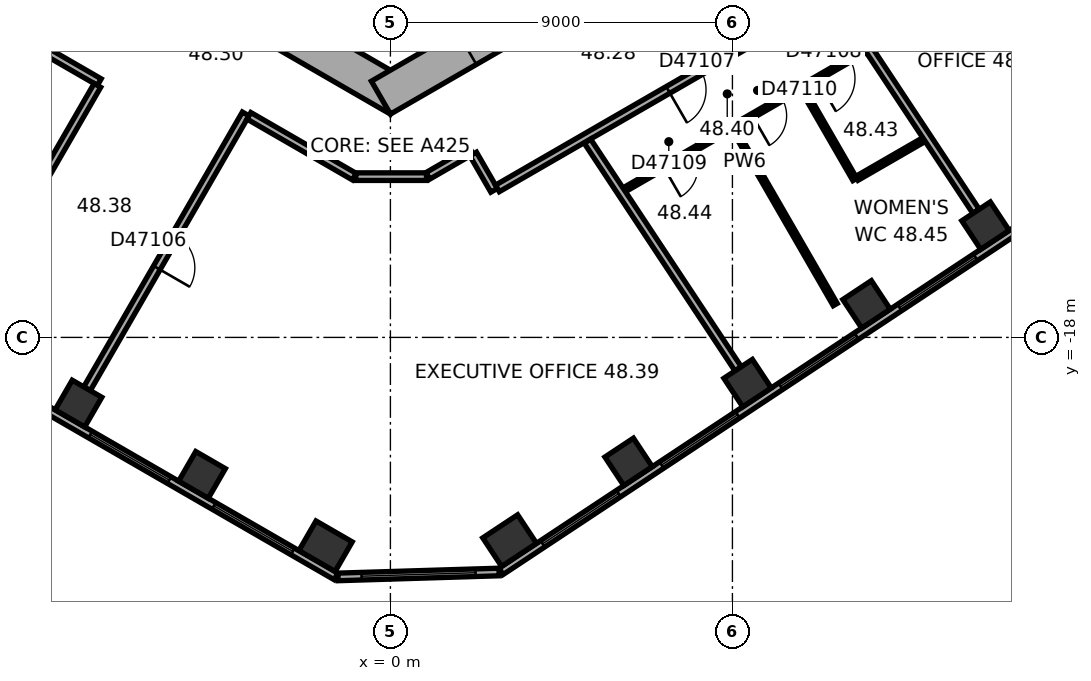
"""IFC4 building model, lengths in metres.
Left out: names, types, materials, properties, quantities, classifications, styles, units other than length and angle.
Written with IfcOpenShell. Run it as: python <this file> out.ifc"""

import sys

from ifc_helpers import new_model, si_unit, direction, frame, frame_2d, origin, origin_2d, place, context, subcontext, project, spatial, rectangle, extrude, element, fill, save


model = new_model("IFC4")
c1 = context("Model", 3, precision=1e-05, world=origin(), true_north=direction((0.0, 1.0)))
c2 = subcontext(c1, "Body", "Model", "MODEL_VIEW")
j1 = project(units=[si_unit("LENGTHUNIT", "METRE"), si_unit("PLANEANGLEUNIT", "RADIAN")], contexts=[c1])
p1 = place(None, origin())
s1 = spatial("IfcSite", under=j1, at=p1, CompositionType="ELEMENT")
p2 = place(p1, origin())
s2 = spatial("IfcBuilding", under=s1, at=p2, CompositionType="ELEMENT")
p3 = place(p2, frame((0.0, 0.0, 194.7)))
s3 = spatial("IfcBuildingStorey", under=s2, at=p3, CompositionType="ELEMENT", Elevation=194.7)
for number, where, z_axis, x_axis in (
    (1, (-8.208, -19.74, 0.0), (0.0, 0.0, 1.0), (0.866, -0.5, 0.0)),
    (2, (-4.958, -21.617, 0.0), (0.0, 0.0, 1.0), (0.866, -0.5, 0.0)),
):
    element("IfcColumn", number, at=place(p3, frame(where, z_axis=z_axis, x_axis=x_axis)), inside=s3, PredefinedType="COLUMN", context=c2, shape_type="SweptSolid", body=[
        extrude(rectangle(XDim=0.9, YDim=0.9, at=origin_2d()), origin(), (0.0, 0.0, 1.0), 3.7),
    ])
for number, where, z_axis, x_axis in (
    (3, (-1.706, -23.494, 0.0), (0.0, 0.0, 1.0), (0.866, -0.5, 0.0)),
    (4, (3.137, -23.346, 0.0), (0.0, 0.0, 1.0), (0.834, 0.552, 0.0)),
):
    element("IfcColumn", number, at=place(p3, frame(where, z_axis=z_axis, x_axis=x_axis)), inside=s3, PredefinedType="COLUMN", context=c2, shape_type="SweptSolid", body=[
        extrude(rectangle(XDim=1.1, YDim=0.9, at=origin_2d()), origin(), (0.0, 0.0, 1.0), 3.7),
    ])
for number, where, z_axis, x_axis in (
    (5, (6.268, -21.274, 0.0), (0.0, 0.0, 1.0), (0.834, 0.552, 0.0)),
    (6, (9.398, -19.202, 0.0), (0.0, 0.0, 1.0), (0.834, 0.552, 0.0)),
    (7, (12.529, -17.13, 0.0), (0.0, 0.0, 1.0), (0.834, 0.552, 0.0)),
    (8, (15.659, -15.058, 0.0), (0.0, 0.0, 1.0), (0.834, 0.552, 0.0)),
):
    element("IfcColumn", number, at=place(p3, frame(where, z_axis=z_axis, x_axis=x_axis)), inside=s3, PredefinedType="COLUMN", context=c2, shape_type="SweptSolid", body=[
        extrude(rectangle(XDim=0.9, YDim=0.9, at=origin_2d()), origin(), (0.0, 0.0, 1.0), 3.7),
    ])
p4 = place(p3, frame((-10.25, -5.629, 0.0), z_axis=(0.0, 0.0, 1.0), x_axis=(0.866022616891, -0.50000482701, 0.0)))
e9 = element("IfcWall", 9, at=p4, inside=s3, PredefinedType="SHEAR", context=c2, shape_type="SweptSolid", body=[
    extrude(rectangle(XDim=12.125, YDim=1.0, at=frame_2d((6.062, 0.0))), origin(), (0.0, 0.0, 1.0), 3.7),
])
p5 = place(p4, frame((6.262, 0.0, 0.0)))
e10 = element("IfcOpeningElement", 10, at=p5, cuts=e9, PredefinedType="OPENING", context=c2, shape_type="SweptSolid", body=[
    extrude(rectangle(XDim=1.5, YDim=2.1, at=frame_2d((0.75, 1.05))), frame((0.0, 0.51, 0.0), z_axis=(0.0, -1.0, 0.0), x_axis=(1.0, 0.0, 0.0)), (0.0, 0.0, 1.0), 1.02),
])
p6 = place(p4, frame((1.712, 0.0, 0.0)))
e11 = element("IfcOpeningElement", 11, at=p6, cuts=e9, PredefinedType="OPENING", context=c2, shape_type="SweptSolid", body=[
    extrude(rectangle(XDim=1.1, YDim=2.1, at=frame_2d((0.55, 1.05))), frame((0.0, 0.51, 0.0), z_axis=(0.0, -1.0, 0.0), x_axis=(1.0, 0.0, 0.0)), (0.0, 0.0, 1.0), 1.02),
])
p7 = place(p4, frame((4.312, 0.0, 0.0)))
e12 = element("IfcOpeningElement", 12, at=p7, cuts=e9, PredefinedType="OPENING", context=c2, shape_type="SweptSolid", body=[
    extrude(rectangle(XDim=1.1, YDim=2.1, at=frame_2d((0.55, 1.05))), frame((0.0, 0.51, 0.0), z_axis=(0.0, -1.0, 0.0), x_axis=(1.0, 0.0, 0.0)), (0.0, 0.0, 1.0), 1.02),
])
p8 = place(p3, frame((-0.25, -11.691, 0.0), z_axis=(0.0, 0.0, 1.0), x_axis=(0.866022616891, 0.50000482701, 0.0)))
e13 = element("IfcWall", 13, at=p8, inside=s3, PredefinedType="SHEAR", context=c2, shape_type="SweptSolid", body=[
    extrude(rectangle(XDim=12.125, YDim=1.0, at=frame_2d((6.062, 0.0))), origin(), (0.0, 0.0, 1.0), 3.7),
])
p9 = place(p8, frame((2.612, 0.0, 0.0)))
e14 = element("IfcOpeningElement", 14, at=p9, cuts=e13, PredefinedType="OPENING", context=c2, shape_type="SweptSolid", body=[
    extrude(rectangle(XDim=1.1, YDim=2.1, at=frame_2d((0.55, 1.05))), frame((0.0, 0.51, 0.0), z_axis=(0.0, -1.0, 0.0), x_axis=(1.0, 0.0, 0.0)), (0.0, 0.0, 1.0), 1.02),
])
p10 = place(p8, frame((5.212, 0.0, 0.0)))
e15 = element("IfcOpeningElement", 15, at=p10, cuts=e13, PredefinedType="OPENING", context=c2, shape_type="SweptSolid", body=[
    extrude(rectangle(XDim=1.1, YDim=2.1, at=frame_2d((0.55, 1.05))), frame((0.0, 0.51, 0.0), z_axis=(0.0, -1.0, 0.0), x_axis=(1.0, 0.0, 0.0)), (0.0, 0.0, 1.0), 1.02),
])
p11 = place(p8, frame((7.812, 0.0, 0.0)))
e16 = element("IfcOpeningElement", 16, at=p11, cuts=e13, PredefinedType="OPENING", context=c2, shape_type="SweptSolid", body=[
    extrude(rectangle(XDim=1.1, YDim=2.1, at=frame_2d((0.55, 1.05))), frame((0.0, 0.51, 0.0), z_axis=(0.0, -1.0, 0.0), x_axis=(1.0, 0.0, 0.0)), (0.0, 0.0, 1.0), 1.02),
])
p12 = place(p3, frame((-18.789, -14.267, 0.0), z_axis=(0.0, 0.0, 1.0), x_axis=(0.866023315909, -0.500003616288, 0.0)))
e17 = element("IfcWall", 17, at=p12, inside=s3, PredefinedType="STANDARD", context=c2, shape_type="SweptSolid", body=[
    extrude(rectangle(XDim=20.044, YDim=0.2, at=frame_2d((10.022, 0.0))), origin(), (0.0, 0.0, 1.0), 3.7),
])
p13 = place(p12, frame((1.314, 0.0, 0.9)))
e18 = element("IfcOpeningElement", 18, at=p13, cuts=e17, PredefinedType="OPENING", context=c2, shape_type="SweptSolid", body=[
    extrude(rectangle(XDim=2.4, YDim=2.0, at=frame_2d((1.2, 1.0))), frame((0.0, 0.11, 0.0), z_axis=(0.0, -1.0, 0.0), x_axis=(1.0, 0.0, 0.0)), (0.0, 0.0, 1.0), 0.22),
])
p14 = place(p12, frame((5.069, 0.0, 0.9)))
e19 = element("IfcOpeningElement", 19, at=p14, cuts=e17, PredefinedType="OPENING", context=c2, shape_type="SweptSolid", body=[
    extrude(rectangle(XDim=2.4, YDim=2.0, at=frame_2d((1.2, 1.0))), frame((0.0, 0.11, 0.0), z_axis=(0.0, -1.0, 0.0), x_axis=(1.0, 0.0, 0.0)), (0.0, 0.0, 1.0), 0.22),
])
p15 = place(p12, frame((8.823, 0.0, 0.9)))
e20 = element("IfcOpeningElement", 20, at=p15, cuts=e17, PredefinedType="OPENING", context=c2, shape_type="SweptSolid", body=[
    extrude(rectangle(XDim=2.4, YDim=2.0, at=frame_2d((1.2, 1.0))), frame((0.0, 0.11, 0.0), z_axis=(0.0, -1.0, 0.0), x_axis=(1.0, 0.0, 0.0)), (0.0, 0.0, 1.0), 0.22),
])
p16 = place(p12, frame((12.577, 0.0, 0.9)))
e21 = element("IfcOpeningElement", 21, at=p16, cuts=e17, PredefinedType="OPENING", context=c2, shape_type="SweptSolid", body=[
    extrude(rectangle(XDim=2.4, YDim=2.0, at=frame_2d((1.2, 1.0))), frame((0.0, 0.11, 0.0), z_axis=(0.0, -1.0, 0.0), x_axis=(1.0, 0.0, 0.0)), (0.0, 0.0, 1.0), 0.22),
])
p17 = place(p12, frame((16.331, 0.0, 0.9)))
e22 = element("IfcOpeningElement", 22, at=p17, cuts=e17, PredefinedType="OPENING", context=c2, shape_type="SweptSolid", body=[
    extrude(rectangle(XDim=2.4, YDim=2.0, at=frame_2d((1.2, 1.0))), frame((0.0, 0.11, 0.0), z_axis=(0.0, -1.0, 0.0), x_axis=(1.0, 0.0, 0.0)), (0.0, 0.0, 1.0), 0.22),
])
p18 = place(p3, frame((-1.378, -24.302, 0.0), z_axis=(0.0, 0.0, 1.0), x_axis=(0.999533857267, 0.030529791629, 0.0)))
e23 = element("IfcWall", 23, at=p18, inside=s3, PredefinedType="STANDARD", context=c2, shape_type="SweptSolid", body=[
    extrude(rectangle(XDim=4.238, YDim=0.2, at=frame_2d((2.119, 0.0))), origin(), (0.0, 0.0, 1.0), 3.7),
])
p19 = place(p18, frame((0.619, 0.0, 0.9)))
e24 = element("IfcOpeningElement", 24, at=p19, cuts=e23, PredefinedType="OPENING", context=c2, shape_type="SweptSolid", body=[
    extrude(rectangle(XDim=3.0, YDim=2.0, at=frame_2d((1.5, 1.0))), frame((0.0, 0.11, 0.0), z_axis=(0.0, -1.0, 0.0), x_axis=(1.0, 0.0, 0.0)), (0.0, 0.0, 1.0), 0.22),
])
p20 = place(p3, frame((2.911, -24.156, 0.0), z_axis=(0.0, 0.0, 1.0), x_axis=(0.833882163564, 0.551942512668, 0.0)))
e25 = element("IfcWall", 25, at=p20, inside=s3, PredefinedType="STANDARD", context=c2, shape_type="SweptSolid", body=[
    extrude(rectangle(XDim=20.044, YDim=0.2, at=frame_2d((10.022, 0.0))), origin(), (0.0, 0.0, 1.0), 3.7),
])
p21 = place(p20, frame((1.313, 0.0, 0.9)))
e26 = element("IfcOpeningElement", 26, at=p21, cuts=e25, PredefinedType="OPENING", context=c2, shape_type="SweptSolid", body=[
    extrude(rectangle(XDim=2.4, YDim=2.0, at=frame_2d((1.2, 1.0))), frame((0.0, 0.11, 0.0), z_axis=(0.0, -1.0, 0.0), x_axis=(1.0, 0.0, 0.0)), (0.0, 0.0, 1.0), 0.22),
])
p22 = place(p20, frame((5.067, 0.0, 0.9)))
e27 = element("IfcOpeningElement", 27, at=p22, cuts=e25, PredefinedType="OPENING", context=c2, shape_type="SweptSolid", body=[
    extrude(rectangle(XDim=2.4, YDim=2.0, at=frame_2d((1.2, 1.0))), frame((0.0, 0.11, 0.0), z_axis=(0.0, -1.0, 0.0), x_axis=(1.0, 0.0, 0.0)), (0.0, 0.0, 1.0), 0.22),
])
p23 = place(p20, frame((8.821, 0.0, 0.9)))
e28 = element("IfcOpeningElement", 28, at=p23, cuts=e25, PredefinedType="OPENING", context=c2, shape_type="SweptSolid", body=[
    extrude(rectangle(XDim=2.4, YDim=2.0, at=frame_2d((1.2, 1.0))), frame((0.0, 0.11, 0.0), z_axis=(0.0, -1.0, 0.0), x_axis=(1.0, 0.0, 0.0)), (0.0, 0.0, 1.0), 0.22),
])
p24 = place(p20, frame((12.575, 0.0, 0.9)))
e29 = element("IfcOpeningElement", 29, at=p24, cuts=e25, PredefinedType="OPENING", context=c2, shape_type="SweptSolid", body=[
    extrude(rectangle(XDim=2.4, YDim=2.0, at=frame_2d((1.2, 1.0))), frame((0.0, 0.11, 0.0), z_axis=(0.0, -1.0, 0.0), x_axis=(1.0, 0.0, 0.0)), (0.0, 0.0, 1.0), 0.22),
])
p25 = place(p20, frame((16.329, 0.0, 0.9)))
e30 = element("IfcOpeningElement", 30, at=p25, cuts=e25, PredefinedType="OPENING", context=c2, shape_type="SweptSolid", body=[
    extrude(rectangle(XDim=2.4, YDim=2.0, at=frame_2d((1.2, 1.0))), frame((0.0, 0.11, 0.0), z_axis=(0.0, -1.0, 0.0), x_axis=(1.0, 0.0, 0.0)), (0.0, 0.0, 1.0), 0.22),
])
p26 = place(p3, frame((-11.651, -8.978, 0.0), z_axis=(0.0, 0.0, 1.0), x_axis=(0.866010893236, -0.500025132165, 0.0)))
e31 = element("IfcWall", 31, at=p26, inside=s3, PredefinedType="PARTITIONING", context=c2, shape_type="SweptSolid", body=[
    extrude(rectangle(XDim=4.608, YDim=0.2, at=frame_2d((2.304, 0.0))), origin(), (0.0, 0.0, 1.0), 3.42),
])
p27 = place(p3, frame((-11.235, -17.474, 0.0), z_axis=(0.0, 0.0, 1.0), x_axis=(0.500009260695, 0.866020057054, 0.0)))
e32 = element("IfcWall", 32, at=p27, inside=s3, PredefinedType="PARTITIONING", context=c2, shape_type="SweptSolid", body=[
    extrude(rectangle(XDim=7.049, YDim=0.2, at=frame_2d((3.524, 0.0))), origin(), (0.0, 0.0, 1.0), 2.87),
])
p28 = place(p27, frame((3.024, 0.0, 0.0)))
e33 = element("IfcOpeningElement", 33, at=p28, cuts=e32, PredefinedType="OPENING", context=c2, shape_type="SweptSolid", body=[
    extrude(rectangle(XDim=1.0, YDim=2.1, at=frame_2d((0.5, 1.05))), frame((0.0, 0.11, 0.0), z_axis=(0.0, -1.0, 0.0), x_axis=(1.0, 0.0, 0.0)), (0.0, 0.0, 1.0), 0.22),
])
p29 = place(p3, frame((-7.984, -19.351, 0.0), z_axis=(0.0, 0.0, 1.0), x_axis=(0.500010139422, 0.866019549707, 0.0)))
e34 = element("IfcWall", 34, at=p29, inside=s3, PredefinedType="PARTITIONING", context=c2, shape_type="SweptSolid", body=[
    extrude(rectangle(XDim=8.35, YDim=0.2, at=frame_2d((4.175, 0.0))), origin(), (0.0, 0.0, 1.0), 3.42),
])
p30 = place(p29, frame((3.675, 0.0, 0.0)))
e35 = element("IfcOpeningElement", 35, at=p30, cuts=e34, PredefinedType="OPENING", context=c2, shape_type="SweptSolid", body=[
    extrude(rectangle(XDim=1.0, YDim=2.1, at=frame_2d((0.5, 1.05))), frame((0.0, 0.11, 0.0), z_axis=(0.0, -1.0, 0.0), x_axis=(1.0, 0.0, 0.0)), (0.0, 0.0, 1.0), 0.22),
])
p31 = place(p3, frame((-3.722, -12.169, 0.0), z_axis=(0.0, 0.0, 1.0), x_axis=(0.866033163891, -0.499986558861, 0.0)))
e36 = element("IfcWall", 36, at=p31, inside=s3, PredefinedType="PARTITIONING", context=c2, shape_type="SweptSolid", body=[
    extrude(rectangle(XDim=3.201, YDim=0.2, at=frame_2d((1.6, 0.0))), origin(), (0.0, 0.0, 1.0), 3.42),
])
p32 = place(p3, frame((-0.91, -13.77, 0.0), z_axis=(0.0, 0.0, 1.0), x_axis=(1.0, 0.0, 0.0)))
e37 = element("IfcWall", 37, at=p32, inside=s3, PredefinedType="PARTITIONING", context=c2, shape_type="SweptSolid", body=[
    extrude(rectangle(XDim=1.86, YDim=0.2, at=frame_2d((0.93, 0.0))), origin(), (0.0, 0.0, 1.0), 3.42),
])
p33 = place(p3, frame((0.985, -13.75, 0.0), z_axis=(0.0, 0.0, 1.0), x_axis=(0.866028661061, 0.499994358189, 0.0)))
e38 = element("IfcWall", 38, at=p33, inside=s3, PredefinedType="PARTITIONING", context=c2, shape_type="SweptSolid", body=[
    extrude(rectangle(XDim=1.321, YDim=0.2, at=frame_2d((0.661, 0.0))), origin(), (0.0, 0.0, 1.0), 3.42),
])
p34 = place(p3, frame((2.179, -13.176, 0.0), z_axis=(0.0, 0.0, 1.0), x_axis=(0.499978356969, -0.866037899034, 0.0)))
e39 = element("IfcWall", 39, at=p34, inside=s3, PredefinedType="PARTITIONING", context=c2, shape_type="SweptSolid", body=[
    extrude(rectangle(XDim=1.101, YDim=0.2, at=frame_2d((0.551, 0.0))), origin(), (0.0, 0.0, 1.0), 3.42),
])
p35 = place(p3, frame((2.816, -14.079, 0.0), z_axis=(0.0, 0.0, 1.0), x_axis=(0.866021128829, 0.500007404367, 0.0)))
e40 = element("IfcWall", 40, at=p35, inside=s3, PredefinedType="PARTITIONING", context=c2, shape_type="SweptSolid", body=[
    extrude(rectangle(XDim=8.702, YDim=0.2, at=frame_2d((4.351, 0.0))), origin(), (0.0, 0.0, 1.0), 3.42),
])
p36 = place(p35, frame((5.184, 0.0, 0.0)))
e41 = element("IfcOpeningElement", 41, at=p36, cuts=e40, PredefinedType="OPENING", context=c2, shape_type="SweptSolid", body=[
    extrude(rectangle(XDim=1.0, YDim=2.1, at=frame_2d((0.5, 1.05))), frame((0.0, 0.11, 0.0), z_axis=(0.0, -1.0, 0.0), x_axis=(1.0, 0.0, 0.0)), (0.0, 0.0, 1.0), 0.22),
])
p37 = place(p3, frame((6.152, -14.116, 0.0), z_axis=(0.0, 0.0, 1.0), x_axis=(0.866026788224, 0.499997602072, 0.0)))
e42 = element("IfcWall", 42, at=p37, inside=s3, PredefinedType="PARTITIONING", context=c2, shape_type="SweptSolid", body=[
    extrude(rectangle(XDim=7.322, YDim=0.12, at=frame_2d((3.661, 0.0))), origin(), (0.0, 0.0, 1.0), 3.42),
])
p38 = place(p37, frame((5.858, 0.0, 0.0)))
e43 = element("IfcOpeningElement", 43, at=p38, cuts=e42, PredefinedType="OPENING", context=c2, shape_type="SweptSolid", body=[
    extrude(rectangle(XDim=1.0, YDim=2.1, at=frame_2d((0.5, 1.05))), frame((0.0, 0.07, 0.0), z_axis=(0.0, -1.0, 0.0), x_axis=(1.0, 0.0, 0.0)), (0.0, 0.0, 1.0), 0.14),
])
p39 = place(p37, frame((1.2, 0.0, 0.0)))
e44 = element("IfcOpeningElement", 44, at=p39, cuts=e42, PredefinedType="OPENING", context=c2, shape_type="SweptSolid", body=[
    extrude(rectangle(XDim=0.9, YDim=2.1, at=frame_2d((0.45, 1.05))), frame((0.0, 0.07, 0.0), z_axis=(0.0, -1.0, 0.0), x_axis=(1.0, 0.0, 0.0)), (0.0, 0.0, 1.0), 0.14),
])
p40 = place(p37, frame((3.897, 0.0, 0.0)))
e45 = element("IfcOpeningElement", 45, at=p40, cuts=e42, PredefinedType="OPENING", context=c2, shape_type="SweptSolid", body=[
    extrude(rectangle(XDim=0.9, YDim=2.1, at=frame_2d((0.45, 1.05))), frame((0.0, 0.07, 0.0), z_axis=(0.0, -1.0, 0.0), x_axis=(1.0, 0.0, 0.0)), (0.0, 0.0, 1.0), 0.14),
])
p41 = place(p3, frame((9.15, -18.827, 0.0), z_axis=(0.0, 0.0, 1.0), x_axis=(-0.551928083938, 0.83389171369, 0.0)))
e46 = element("IfcWall", 46, at=p41, inside=s3, PredefinedType="PARTITIONING", context=c2, shape_type="SweptSolid", body=[
    extrude(rectangle(XDim=7.182, YDim=0.2, at=frame_2d((3.591, 0.0))), origin(), (0.0, 0.0, 1.0), 2.87),
])
p42 = place(p3, frame((10.853, -11.472, 0.0), z_axis=(0.0, 0.0, 1.0), x_axis=(0.500048966069, -0.865997131366, 0.0)))
e47 = element("IfcWall", 47, at=p42, inside=s3, PredefinedType="PARTITIONING", context=c2, shape_type="SweptSolid", body=[
    extrude(rectangle(XDim=2.74, YDim=0.12, at=frame_2d((1.37, 0.0))), origin(), (0.0, 0.0, 1.0), 3.42),
])
p43 = place(p3, frame((11.705, -17.136, 0.0), z_axis=(0.0, 0.0, 1.0), x_axis=(-0.499985382219, 0.8660338432, 0.0)))
e48 = element("IfcWall", 48, at=p43, inside=s3, PredefinedType="PARTITIONING", context=c2, shape_type="SweptSolid", body=[
    extrude(rectangle(XDim=5.332, YDim=0.12, at=frame_2d((2.666, 0.0))), origin(), (0.0, 0.0, 1.0), 3.42),
])
p44 = place(p3, frame((12.275, -13.814, 0.0), z_axis=(0.0, 0.0, 1.0), x_axis=(0.866010195725, 0.500026340207, 0.0)))
e49 = element("IfcWall", 49, at=p44, inside=s3, PredefinedType="PARTITIONING", context=c2, shape_type="SweptSolid", body=[
    extrude(rectangle(XDim=2.04, YDim=0.12, at=frame_2d((1.02, 0.0))), origin(), (0.0, 0.0, 1.0), 3.42),
])
p45 = place(p3, frame((15.411, -14.683, 0.0), z_axis=(0.0, 0.0, 1.0), x_axis=(-0.551932106251, 0.833889051427, 0.0)))
e50 = element("IfcWall", 50, at=p45, inside=s3, PredefinedType="PARTITIONING", context=c2, shape_type="SweptSolid", body=[
    extrude(rectangle(XDim=7.926, YDim=0.2, at=frame_2d((3.963, 0.0))), origin(), (0.0, 0.0, 1.0), 2.87),
])
p46 = place(p16, origin())
e51 = element("IfcWindow", 51, at=p46, inside=s3, PartitioningType="SINGLE_PANEL", PredefinedType="WINDOW", context=c2, shape_type="SweptSolid", body=[
    extrude(rectangle(XDim=2.4, YDim=2.0, at=frame_2d((1.2, 1.0))), frame((0.0, 0.03, 0.0), z_axis=(0.0, -1.0, 0.0), x_axis=(1.0, 0.0, 0.0)), (0.0, 0.0, 1.0), 0.06),
])
fill(e21, e51)
p47 = place(p17, origin())
e52 = element("IfcWindow", 52, at=p47, inside=s3, PartitioningType="SINGLE_PANEL", PredefinedType="WINDOW", context=c2, shape_type="SweptSolid", body=[
    extrude(rectangle(XDim=2.4, YDim=2.0, at=frame_2d((1.2, 1.0))), frame((0.0, 0.03, 0.0), z_axis=(0.0, -1.0, 0.0), x_axis=(1.0, 0.0, 0.0)), (0.0, 0.0, 1.0), 0.06),
])
fill(e22, e52)
p48 = place(p19, origin())
e53 = element("IfcWindow", 53, at=p48, inside=s3, PartitioningType="SINGLE_PANEL", PredefinedType="WINDOW", context=c2, shape_type="SweptSolid", body=[
    extrude(rectangle(XDim=3.0, YDim=2.0, at=frame_2d((1.5, 1.0))), frame((0.0, 0.03, 0.0), z_axis=(0.0, -1.0, 0.0), x_axis=(1.0, 0.0, 0.0)), (0.0, 0.0, 1.0), 0.06),
])
fill(e24, e53)
p49 = place(p21, origin())
e54 = element("IfcWindow", 54, at=p49, inside=s3, PartitioningType="SINGLE_PANEL", PredefinedType="WINDOW", context=c2, shape_type="SweptSolid", body=[
    extrude(rectangle(XDim=2.4, YDim=2.0, at=frame_2d((1.2, 1.0))), frame((0.0, 0.03, 0.0), z_axis=(0.0, -1.0, 0.0), x_axis=(1.0, 0.0, 0.0)), (0.0, 0.0, 1.0), 0.06),
])
fill(e26, e54)
p50 = place(p22, origin())
e55 = element("IfcWindow", 55, at=p50, inside=s3, PartitioningType="SINGLE_PANEL", PredefinedType="WINDOW", context=c2, shape_type="SweptSolid", body=[
    extrude(rectangle(XDim=2.4, YDim=2.0, at=frame_2d((1.2, 1.0))), frame((0.0, 0.03, 0.0), z_axis=(0.0, -1.0, 0.0), x_axis=(1.0, 0.0, 0.0)), (0.0, 0.0, 1.0), 0.06),
])
fill(e27, e55)
p51 = place(p23, origin())
e56 = element("IfcWindow", 56, at=p51, inside=s3, PartitioningType="SINGLE_PANEL", PredefinedType="WINDOW", context=c2, shape_type="SweptSolid", body=[
    extrude(rectangle(XDim=2.4, YDim=2.0, at=frame_2d((1.2, 1.0))), frame((0.0, 0.03, 0.0), z_axis=(0.0, -1.0, 0.0), x_axis=(1.0, 0.0, 0.0)), (0.0, 0.0, 1.0), 0.06),
])
fill(e28, e56)
p52 = place(p24, origin())
e57 = element("IfcWindow", 57, at=p52, inside=s3, PartitioningType="SINGLE_PANEL", PredefinedType="WINDOW", context=c2, shape_type="SweptSolid", body=[
    extrude(rectangle(XDim=2.4, YDim=2.0, at=frame_2d((1.2, 1.0))), frame((0.0, 0.03, 0.0), z_axis=(0.0, -1.0, 0.0), x_axis=(1.0, 0.0, 0.0)), (0.0, 0.0, 1.0), 0.06),
])
fill(e29, e57)
p53 = place(p30, origin())
e58 = element("IfcDoor", 58, at=p53, inside=s3, OperationType="SINGLE_SWING_LEFT", PredefinedType="DOOR", context=c2, shape_type="SweptSolid", body=[
    extrude(rectangle(XDim=1.0, YDim=2.1, at=frame_2d((0.5, 1.05))), frame((0.0, 0.025, 0.0), z_axis=(0.0, -1.0, 0.0), x_axis=(1.0, 0.0, 0.0)), (0.0, 0.0, 1.0), 0.05),
])
fill(e35, e58)
p54 = place(p36, origin())
e59 = element("IfcDoor", 59, at=p54, inside=s3, OperationType="SINGLE_SWING_LEFT", PredefinedType="DOOR", context=c2, shape_type="SweptSolid", body=[
    extrude(rectangle(XDim=1.0, YDim=2.1, at=frame_2d((0.5, 1.05))), frame((0.0, 0.025, 0.0), z_axis=(0.0, -1.0, 0.0), x_axis=(1.0, 0.0, 0.0)), (0.0, 0.0, 1.0), 0.05),
])
fill(e41, e59)
p55 = place(p38, origin())
e60 = element("IfcDoor", 60, at=p55, inside=s3, OperationType="SINGLE_SWING_LEFT", PredefinedType="DOOR", context=c2, shape_type="SweptSolid", body=[
    extrude(rectangle(XDim=1.0, YDim=2.1, at=frame_2d((0.5, 1.05))), frame((0.0, 0.025, 0.0), z_axis=(0.0, -1.0, 0.0), x_axis=(1.0, 0.0, 0.0)), (0.0, 0.0, 1.0), 0.05),
])
fill(e43, e60)
p56 = place(p39, origin())
e61 = element("IfcDoor", 61, at=p56, inside=s3, OperationType="SINGLE_SWING_LEFT", PredefinedType="DOOR", context=c2, shape_type="SweptSolid", body=[
    extrude(rectangle(XDim=0.9, YDim=2.1, at=frame_2d((0.45, 1.05))), frame((0.0, 0.025, 0.0), z_axis=(0.0, -1.0, 0.0), x_axis=(1.0, 0.0, 0.0)), (0.0, 0.0, 1.0), 0.05),
])
fill(e44, e61)
p57 = place(p40, origin())
e62 = element("IfcDoor", 62, at=p57, inside=s3, OperationType="SINGLE_SWING_LEFT", PredefinedType="DOOR", context=c2, shape_type="SweptSolid", body=[
    extrude(rectangle(XDim=0.9, YDim=2.1, at=frame_2d((0.45, 1.05))), frame((0.0, 0.025, 0.0), z_axis=(0.0, -1.0, 0.0), x_axis=(1.0, 0.0, 0.0)), (0.0, 0.0, 1.0), 0.05),
])
fill(e45, e62)
save(model, sys.argv[1])
